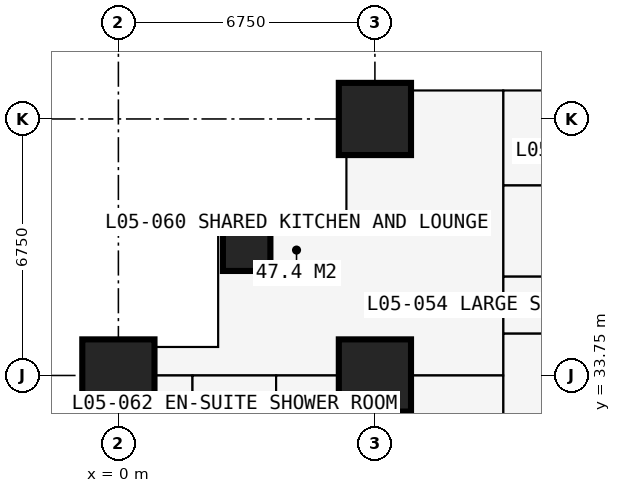
"""IFC4 building model, lengths in metres.
Left out: names, types, materials, properties, quantities, classifications, styles, units other than length and angle.
Written with IfcOpenShell. Run it as: python <this file> out.ifc"""

import sys

from ifc_helpers import new_model, si_unit, direction, frame, frame_2d, origin, origin_2d, place, context, subcontext, project, spatial, rectangle, extrude, element, fill, save


model = new_model("IFC4")
c1 = context("Model", 3, precision=1e-05, world=origin(), true_north=direction((0.0, 1.0)))
c2 = subcontext(c1, "Body", "Model", "MODEL_VIEW")
j1 = project(units=[si_unit("LENGTHUNIT", "METRE"), si_unit("PLANEANGLEUNIT", "RADIAN")], contexts=[c1])
p1 = place(None, origin())
s1 = spatial("IfcSite", under=j1, at=p1, CompositionType="ELEMENT")
p2 = place(p1, origin())
s2 = spatial("IfcBuilding", under=s1, at=p2, CompositionType="ELEMENT")
p3 = place(p2, frame((0.0, 0.0, 21.6)))
s3 = spatial("IfcBuildingStorey", under=s2, at=p3, CompositionType="ELEMENT", Elevation=21.6)
p4 = place(p3, frame((0.0, 33.75, 0.0), z_axis=(0.0, 0.0, 1.0), x_axis=(1.0, 0.0, 0.0)))
e1 = element("IfcColumn", 1, at=p4, inside=s3, PredefinedType="COLUMN", context=c2, shape_type="SweptSolid", body=[
    extrude(rectangle(XDim=1.9, YDim=1.9, at=origin_2d()), origin(), (0.0, 0.0, 1.0), 3.6),
])
p5 = place(p3, frame((3.375, 37.125, 0.0), z_axis=(0.0, 0.0, 1.0), x_axis=(1.0, 0.0, 0.0)))
e2 = element("IfcColumn", 2, at=p5, inside=s3, PredefinedType="COLUMN", context=c2, shape_type="SweptSolid", body=[
    extrude(rectangle(XDim=1.25, YDim=1.25, at=origin_2d()), origin(), (0.0, 0.0, 1.0), 3.6),
])
for number, where, z_axis, x_axis in (
    (3, (6.75, 33.75, 0.0), (0.0, 0.0, 1.0), (1.0, 0.0, 0.0)),
    (4, (6.75, 40.5, 0.0), (0.0, 0.0, 1.0), (1.0, 0.0, 0.0)),
):
    element("IfcColumn", number, at=place(p3, frame(where, z_axis=z_axis, x_axis=x_axis)), inside=s3, PredefinedType="COLUMN", context=c2, shape_type="SweptSolid", body=[
        extrude(rectangle(XDim=1.9, YDim=1.9, at=origin_2d()), origin(), (0.0, 0.0, 1.0), 3.6),
    ])
p6 = place(p3, frame((6.0, 41.25, 0.0), z_axis=(0.0, 0.0, 1.0), x_axis=(0.0, -1.0, 0.0)))
e5 = element("IfcWall", 5, at=p6, inside=s3, PredefinedType="SOLIDWALL", context=c2, shape_type="SweptSolid", body=[
    extrude(rectangle(XDim=3.375, YDim=0.3, at=frame_2d((1.688, 0.0))), origin(), (0.0, 0.0, 1.0), 3.375),
])
p7 = place(p6, frame((1.857, 0.0, 0.9)))
e6 = element("IfcOpeningElement", 6, at=p7, cuts=e5, PredefinedType="OPENING", context=c2, shape_type="SweptSolid", body=[
    extrude(rectangle(XDim=1.2, YDim=1.8, at=frame_2d((0.6, 0.9))), frame((0.0, 0.16, 0.0), z_axis=(0.0, -1.0, 0.0), x_axis=(1.0, 0.0, 0.0)), (0.0, 0.0, 1.0), 0.32),
])
p8 = place(p3, frame((6.0, 37.875, 0.0), z_axis=(0.0, 0.0, 1.0), x_axis=(-1.0, 0.0, 0.0)))
e7 = element("IfcWall", 7, at=p8, inside=s3, PredefinedType="SOLIDWALL", context=c2, shape_type="SweptSolid", body=[
    extrude(rectangle(XDim=3.375, YDim=0.3, at=frame_2d((1.688, 0.0))), origin(), (0.0, 0.0, 1.0), 3.375),
])
p9 = place(p8, frame((0.788, 0.0, 0.6)))
e8 = element("IfcOpeningElement", 8, at=p9, cuts=e7, PredefinedType="OPENING", context=c2, shape_type="SweptSolid", body=[
    extrude(rectangle(XDim=1.8, YDim=2.1, at=frame_2d((0.9, 1.05))), frame((0.0, 0.16, 0.0), z_axis=(0.0, -1.0, 0.0), x_axis=(1.0, 0.0, 0.0)), (0.0, 0.0, 1.0), 0.32),
])
p10 = place(p3, frame((2.625, 37.875, 0.0), z_axis=(0.0, 0.0, 1.0), x_axis=(0.0, -1.0, 0.0)))
e9 = element("IfcWall", 9, at=p10, inside=s3, PredefinedType="SOLIDWALL", context=c2, shape_type="SweptSolid", body=[
    extrude(rectangle(XDim=3.375, YDim=0.3, at=frame_2d((1.688, 0.0))), origin(), (0.0, 0.0, 1.0), 3.375),
])
p11 = place(p10, frame((0.788, 0.0, 0.6)))
e10 = element("IfcOpeningElement", 10, at=p11, cuts=e9, PredefinedType="OPENING", context=c2, shape_type="SweptSolid", body=[
    extrude(rectangle(XDim=1.8, YDim=2.1, at=frame_2d((0.9, 1.05))), frame((0.0, 0.16, 0.0), z_axis=(0.0, -1.0, 0.0), x_axis=(1.0, 0.0, 0.0)), (0.0, 0.0, 1.0), 0.32),
])
p12 = place(p3, frame((2.625, 34.5, 0.0), z_axis=(0.0, 0.0, 1.0), x_axis=(-1.0, 0.0, 0.0)))
e11 = element("IfcWall", 11, at=p12, inside=s3, PredefinedType="SOLIDWALL", context=c2, shape_type="SweptSolid", body=[
    extrude(rectangle(XDim=3.375, YDim=0.3, at=frame_2d((1.688, 0.0))), origin(), (0.0, 0.0, 1.0), 3.375),
])
p13 = place(p12, frame((0.317, 0.0, 0.9)))
e12 = element("IfcOpeningElement", 12, at=p13, cuts=e11, PredefinedType="OPENING", context=c2, shape_type="SweptSolid", body=[
    extrude(rectangle(XDim=1.2, YDim=1.8, at=frame_2d((0.6, 0.9))), frame((0.0, 0.16, 0.0), z_axis=(0.0, -1.0, 0.0), x_axis=(1.0, 0.0, 0.0)), (0.0, 0.0, 1.0), 0.32),
])
p14 = place(p3, frame((-0.734, 33.75, 0.0), z_axis=(0.0, 0.0, 1.0), x_axis=(1.0, 0.0, 0.0)))
e13 = element("IfcWall", 13, at=p14, inside=s3, PredefinedType="PARTITIONING", context=c2, shape_type="SweptSolid", body=[
    extrude(rectangle(XDim=10.859, YDim=0.15, at=frame_2d((5.429, 0.0))), origin(), (0.0, 0.0, 1.0), 2.877),
])
p15 = place(p14, frame((8.434, 0.0, 0.0)))
e14 = element("IfcOpeningElement", 14, at=p15, cuts=e13, PredefinedType="OPENING", context=c2, shape_type="SweptSolid", body=[
    extrude(rectangle(XDim=1.0, YDim=2.2, at=frame_2d((0.5, 1.1))), frame((0.0, 0.085, 0.0), z_axis=(0.0, -1.0, 0.0), x_axis=(1.0, 0.0, 0.0)), (0.0, 0.0, 1.0), 0.17),
])
p16 = place(p3, frame((1.95, 31.75, 0.0), z_axis=(0.0, 0.0, 1.0), x_axis=(0.0, 1.0, 0.0)))
e15 = element("IfcWall", 15, at=p16, inside=s3, PredefinedType="PARTITIONING", context=c2, shape_type="SweptSolid", body=[
    extrude(rectangle(XDim=2.0, YDim=0.1, at=frame_2d((1.0, 0.0))), origin(), (0.0, 0.0, 1.0), 3.375),
])
p17 = place(p3, frame((4.15, 10.125, 0.0), z_axis=(0.0, 0.0, 1.0), x_axis=(0.0, 1.0, 0.0)))
e16 = element("IfcWall", 16, at=p17, inside=s3, PredefinedType="PARTITIONING", context=c2, shape_type="SweptSolid", body=[
    extrude(rectangle(XDim=23.625, YDim=0.15, at=frame_2d((11.812, 0.0))), origin(), (0.0, 0.0, 1.0), 3.375),
])
p18 = place(p17, frame((20.5, 0.0, 0.0)))
e17 = element("IfcOpeningElement", 17, at=p18, cuts=e16, PredefinedType="OPENING", context=c2, shape_type="SweptSolid", body=[
    extrude(rectangle(XDim=0.95, YDim=2.2, at=frame_2d((0.475, 1.1))), frame((0.0, 0.085, 0.0), z_axis=(0.0, -1.0, 0.0), x_axis=(1.0, 0.0, 0.0)), (0.0, 0.0, 1.0), 0.17),
])
p19 = place(p17, frame((17.125, 0.0, 0.0)))
e18 = element("IfcOpeningElement", 18, at=p19, cuts=e16, PredefinedType="OPENING", context=c2, shape_type="SweptSolid", body=[
    extrude(rectangle(XDim=0.95, YDim=2.2, at=frame_2d((0.475, 1.1))), frame((0.0, 0.085, 0.0), z_axis=(0.0, -1.0, 0.0), x_axis=(1.0, 0.0, 0.0)), (0.0, 0.0, 1.0), 0.17),
])
p20 = place(p17, frame((13.7, 0.0, 0.0)))
e19 = element("IfcOpeningElement", 19, at=p20, cuts=e16, PredefinedType="OPENING", context=c2, shape_type="SweptSolid", body=[
    extrude(rectangle(XDim=0.95, YDim=2.2, at=frame_2d((0.475, 1.1))), frame((0.0, 0.085, 0.0), z_axis=(0.0, -1.0, 0.0), x_axis=(1.0, 0.0, 0.0)), (0.0, 0.0, 1.0), 0.17),
])
p21 = place(p17, frame((4.2, 0.0, 0.0)))
e20 = element("IfcOpeningElement", 20, at=p21, cuts=e16, PredefinedType="OPENING", context=c2, shape_type="SweptSolid", body=[
    extrude(rectangle(XDim=0.95, YDim=2.2, at=frame_2d((0.475, 1.1))), frame((0.0, 0.085, 0.0), z_axis=(0.0, -1.0, 0.0), x_axis=(1.0, 0.0, 0.0)), (0.0, 0.0, 1.0), 0.17),
])
p22 = place(p17, frame((10.95, 0.0, 0.0)))
e21 = element("IfcOpeningElement", 21, at=p22, cuts=e16, PredefinedType="OPENING", context=c2, shape_type="SweptSolid", body=[
    extrude(rectangle(XDim=0.95, YDim=2.2, at=frame_2d((0.475, 1.1))), frame((0.0, 0.085, 0.0), z_axis=(0.0, -1.0, 0.0), x_axis=(1.0, 0.0, 0.0)), (0.0, 0.0, 1.0), 0.17),
])
p23 = place(p3, frame((10.125, 30.375, 0.0), z_axis=(0.0, 0.0, 1.0), x_axis=(0.0, 1.0, 0.0)))
e22 = element("IfcWall", 22, at=p23, inside=s3, PredefinedType="PARTITIONING", context=c2, shape_type="SweptSolid", body=[
    extrude(rectangle(XDim=10.859, YDim=0.15, at=frame_2d((5.429, 0.0))), origin(), (0.0, 0.0, 1.0), 3.375),
])
p24 = place(p3, frame((10.125, 34.85, 0.0), z_axis=(0.0, 0.0, 1.0), x_axis=(1.0, 0.0, 0.0)))
e23 = element("IfcWall", 23, at=p24, inside=s3, PredefinedType="PARTITIONING", context=c2, shape_type="SweptSolid", body=[
    extrude(rectangle(XDim=10.762, YDim=0.15, at=frame_2d((5.381, 0.0))), origin(), (0.0, 0.0, 1.0), 3.375),
])
p25 = place(p24, frame((4.9, 0.0, 0.0)))
e24 = element("IfcOpeningElement", 24, at=p25, cuts=e23, PredefinedType="OPENING", context=c2, shape_type="SweptSolid", body=[
    extrude(rectangle(XDim=0.95, YDim=2.2, at=frame_2d((0.475, 1.1))), frame((0.0, 0.085, 0.0), z_axis=(0.0, -1.0, 0.0), x_axis=(1.0, 0.0, 0.0)), (0.0, 0.0, 1.0), 0.17),
])
p26 = place(p3, frame((10.125, 36.35, 0.0), z_axis=(0.0, 0.0, 1.0), x_axis=(1.0, 0.0, 0.0)))
e25 = element("IfcWall", 25, at=p26, inside=s3, PredefinedType="PARTITIONING", context=c2, shape_type="SweptSolid", body=[
    extrude(rectangle(XDim=23.625, YDim=0.15, at=frame_2d((11.812, 0.0))), origin(), (0.0, 0.0, 1.0), 3.375),
])
p27 = place(p26, frame((21.45, 0.0, 0.0)))
e26 = element("IfcOpeningElement", 26, at=p27, cuts=e25, PredefinedType="OPENING", context=c2, shape_type="SweptSolid", body=[
    extrude(rectangle(XDim=1.0, YDim=2.2, at=frame_2d((0.5, 1.1))), frame((0.0, 0.085, 0.0), z_axis=(0.0, -1.0, 0.0), x_axis=(1.0, 0.0, 0.0)), (0.0, 0.0, 1.0), 0.17),
])
p28 = place(p26, frame((17.125, 0.0, 0.0)))
e27 = element("IfcOpeningElement", 27, at=p28, cuts=e25, PredefinedType="OPENING", context=c2, shape_type="SweptSolid", body=[
    extrude(rectangle(XDim=0.95, YDim=2.2, at=frame_2d((0.475, 1.1))), frame((0.0, 0.085, 0.0), z_axis=(0.0, -1.0, 0.0), x_axis=(1.0, 0.0, 0.0)), (0.0, 0.0, 1.0), 0.17),
])
p29 = place(p26, frame((13.7, 0.0, 0.0)))
e28 = element("IfcOpeningElement", 28, at=p29, cuts=e25, PredefinedType="OPENING", context=c2, shape_type="SweptSolid", body=[
    extrude(rectangle(XDim=0.95, YDim=2.2, at=frame_2d((0.475, 1.1))), frame((0.0, 0.085, 0.0), z_axis=(0.0, -1.0, 0.0), x_axis=(1.0, 0.0, 0.0)), (0.0, 0.0, 1.0), 0.17),
])
p30 = place(p26, frame((4.2, 0.0, 0.0)))
e29 = element("IfcOpeningElement", 29, at=p30, cuts=e25, PredefinedType="OPENING", context=c2, shape_type="SweptSolid", body=[
    extrude(rectangle(XDim=0.95, YDim=2.2, at=frame_2d((0.475, 1.1))), frame((0.0, 0.085, 0.0), z_axis=(0.0, -1.0, 0.0), x_axis=(1.0, 0.0, 0.0)), (0.0, 0.0, 1.0), 0.17),
])
p31 = place(p26, frame((10.95, 0.0, 0.0)))
e30 = element("IfcOpeningElement", 30, at=p31, cuts=e25, PredefinedType="OPENING", context=c2, shape_type="SweptSolid", body=[
    extrude(rectangle(XDim=0.95, YDim=2.2, at=frame_2d((0.475, 1.1))), frame((0.0, 0.085, 0.0), z_axis=(0.0, -1.0, 0.0), x_axis=(1.0, 0.0, 0.0)), (0.0, 0.0, 1.0), 0.17),
])
p32 = place(p3, frame((10.125, 38.75, 0.0), z_axis=(0.0, 0.0, 1.0), x_axis=(1.0, 0.0, 0.0)))
e31 = element("IfcWall", 31, at=p32, inside=s3, PredefinedType="PARTITIONING", context=c2, shape_type="SweptSolid", body=[
    extrude(rectangle(XDim=2.6, YDim=0.1, at=frame_2d((1.3, 0.0))), origin(), (0.0, 0.0, 1.0), 3.375),
])
p33 = place(p32, frame((0.85, 0.0, 0.0)))
e32 = element("IfcOpeningElement", 32, at=p33, cuts=e31, PredefinedType="OPENING", context=c2, shape_type="SweptSolid", body=[
    extrude(rectangle(XDim=0.9, YDim=2.2, at=frame_2d((0.45, 1.1))), frame((0.0, 0.06, 0.0), z_axis=(0.0, -1.0, 0.0), x_axis=(1.0, 0.0, 0.0)), (0.0, 0.0, 1.0), 0.12),
])
p34 = place(p7, origin())
e33 = element("IfcWindow", 33, at=p34, inside=s3, PartitioningType="SINGLE_PANEL", PredefinedType="WINDOW", context=c2, shape_type="SweptSolid", body=[
    extrude(rectangle(XDim=1.2, YDim=1.8, at=frame_2d((0.6, 0.9))), frame((0.0, 0.03, 0.0), z_axis=(0.0, -1.0, 0.0), x_axis=(1.0, 0.0, 0.0)), (0.0, 0.0, 1.0), 0.06),
])
fill(e6, e33)
p35 = place(p9, origin())
e34 = element("IfcWindow", 34, at=p35, inside=s3, PartitioningType="SINGLE_PANEL", PredefinedType="WINDOW", context=c2, shape_type="SweptSolid", body=[
    extrude(rectangle(XDim=1.8, YDim=2.1, at=frame_2d((0.9, 1.05))), frame((0.0, 0.03, 0.0), z_axis=(0.0, -1.0, 0.0), x_axis=(1.0, 0.0, 0.0)), (0.0, 0.0, 1.0), 0.06),
])
fill(e8, e34)
p36 = place(p11, origin())
e35 = element("IfcWindow", 35, at=p36, inside=s3, PartitioningType="SINGLE_PANEL", PredefinedType="WINDOW", context=c2, shape_type="SweptSolid", body=[
    extrude(rectangle(XDim=1.8, YDim=2.1, at=frame_2d((0.9, 1.05))), frame((0.0, 0.03, 0.0), z_axis=(0.0, -1.0, 0.0), x_axis=(1.0, 0.0, 0.0)), (0.0, 0.0, 1.0), 0.06),
])
fill(e10, e35)
p37 = place(p13, origin())
e36 = element("IfcWindow", 36, at=p37, inside=s3, PartitioningType="SINGLE_PANEL", PredefinedType="WINDOW", context=c2, shape_type="SweptSolid", body=[
    extrude(rectangle(XDim=1.2, YDim=1.8, at=frame_2d((0.6, 0.9))), frame((0.0, 0.03, 0.0), z_axis=(0.0, -1.0, 0.0), x_axis=(1.0, 0.0, 0.0)), (0.0, 0.0, 1.0), 0.06),
])
fill(e12, e36)
p38 = place(p33, origin())
e37 = element("IfcDoor", 37, at=p38, inside=s3, OperationType="SINGLE_SWING_RIGHT", PredefinedType="DOOR", context=c2, shape_type="SweptSolid", body=[
    extrude(rectangle(XDim=0.9, YDim=2.2, at=frame_2d((0.45, 1.1))), frame((0.0, 0.025, 0.0), z_axis=(0.0, -1.0, 0.0), x_axis=(1.0, 0.0, 0.0)), (0.0, 0.0, 1.0), 0.05),
])
fill(e32, e37)
p39 = place(p15, origin())
e38 = element("IfcDoor", 38, at=p39, inside=s3, OperationType="SINGLE_SWING_LEFT", PredefinedType="DOOR", context=c2, shape_type="SweptSolid", body=[
    extrude(rectangle(XDim=1.0, YDim=2.2, at=frame_2d((0.5, 1.1))), frame((0.0, 0.025, 0.0), z_axis=(0.0, -1.0, 0.0), x_axis=(1.0, 0.0, 0.0)), (0.0, 0.0, 1.0), 0.05),
])
fill(e14, e38)
save(model, sys.argv[1])
